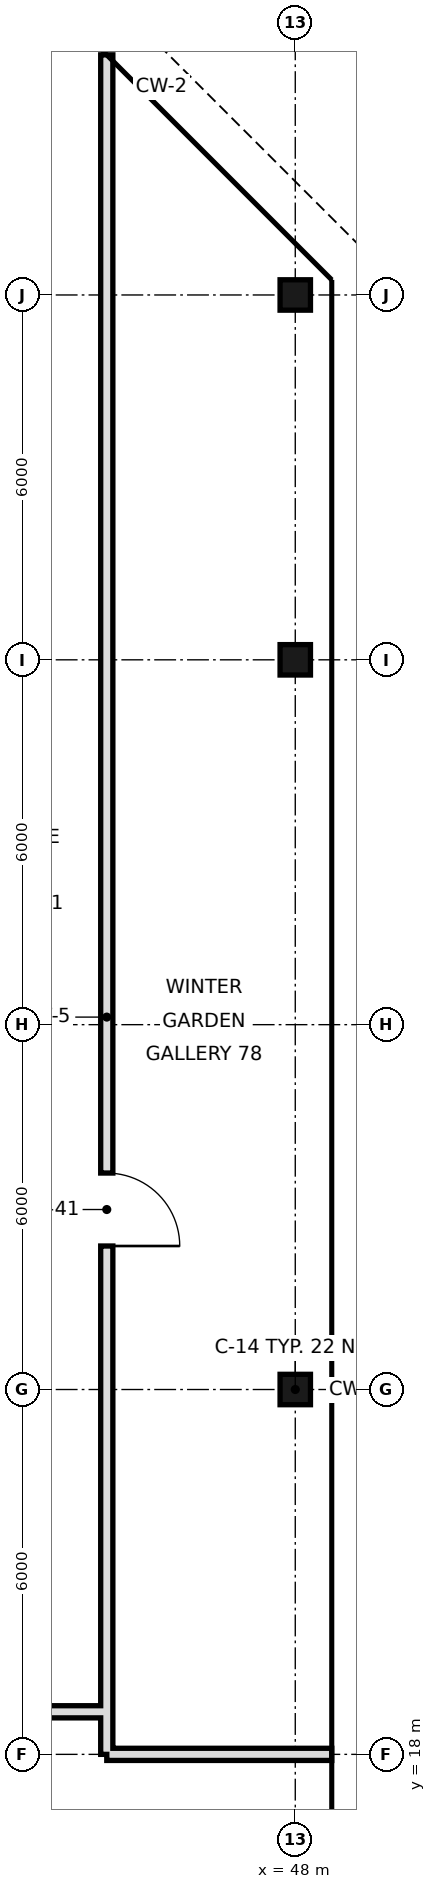
"""IFC4 building model, lengths in metres.
Left out: names, types, materials, properties, quantities, classifications, styles, units other than length and angle.
Written with IfcOpenShell. Run it as: python <this file> out.ifc"""

import sys

from ifc_helpers import new_model, si_unit, direction, frame, frame_2d, origin, origin_2d, place, context, subcontext, project, spatial, rectangle, hollow_rectangle, extrude, element, fill, save


model = new_model("IFC4")
c1 = context("Model", 3, precision=1e-05, world=origin(), true_north=direction((0.0, 1.0)))
c2 = subcontext(c1, "Body", "Model", "MODEL_VIEW")
j1 = project(units=[si_unit("LENGTHUNIT", "METRE"), si_unit("PLANEANGLEUNIT", "RADIAN")], contexts=[c1])
p1 = place(None, origin())
s1 = spatial("IfcSite", under=j1, at=p1, CompositionType="ELEMENT")
p2 = place(p1, origin())
s2 = spatial("IfcBuilding", under=s1, at=p2, CompositionType="ELEMENT")
p3 = place(p2, frame((0.0, 0.0, 326.8)))
s3 = spatial("IfcBuildingStorey", under=s2, at=p3, CompositionType="ELEMENT", Elevation=326.8)
for number, where, z_axis, x_axis in (
    (1, (48.0, 24.0, 0.0), (0.0, 0.0, 1.0), (1.0, 0.0, 0.0)),
    (2, (48.0, 36.0, 0.0), (0.0, 0.0, 1.0), (1.0, 0.0, 0.0)),
):
    element("IfcColumn", number, at=place(p3, frame(where, z_axis=z_axis, x_axis=x_axis)), inside=s3, PredefinedType="COLUMN", context=c2, shape_type="SweptSolid", body=[
        extrude(hollow_rectangle(XDim=0.5, YDim=0.5, WallThickness=0.025, at=origin_2d()), origin(), (0.0, 0.0, 1.0), 4.4),
    ])
p4 = place(p3, frame((48.0, 42.0, 0.0), z_axis=(0.0, 0.0, 1.0), x_axis=(1.0, 0.0, 0.0)))
e3 = element("IfcColumn", 3, at=p4, inside=s3, PredefinedType="COLUMN", context=c2, shape_type="SweptSolid", body=[
    extrude(hollow_rectangle(XDim=0.5, YDim=0.5, WallThickness=0.025, at=origin_2d()), origin(), (0.0, 0.0, 1.0), 4.1),
])
p5 = place(p3, frame((44.9, 18.0, 0.0), z_axis=(0.0, 0.0, 1.0), x_axis=(0.0, 1.0, 0.0)))
e4 = element("IfcWall", 4, at=p5, inside=s3, PredefinedType="SOLIDWALL", context=c2, shape_type="SweptSolid", body=[
    extrude(rectangle(XDim=27.949, YDim=0.2, at=frame_2d((13.975, 0.0))), origin(), (0.0, 0.0, 1.0), 3.5),
])
p6 = place(p5, frame((8.36, 0.0, 0.0)))
e5 = element("IfcOpeningElement", 5, at=p6, cuts=e4, PredefinedType="OPENING", context=c2, shape_type="SweptSolid", body=[
    extrude(rectangle(XDim=1.2, YDim=2.4, at=frame_2d((0.6, 1.2))), frame((0.0, 0.11, 0.0), z_axis=(0.0, -1.0, 0.0), x_axis=(1.0, 0.0, 0.0)), (0.0, 0.0, 1.0), 0.22),
])
p7 = place(p3, frame((44.9, 18.0, 0.0), z_axis=(0.0, 0.0, 1.0), x_axis=(1.0, 0.0, 0.0)))
e6 = element("IfcWall", 6, at=p7, inside=s3, PredefinedType="SOLIDWALL", context=c2, shape_type="SweptSolid", body=[
    extrude(rectangle(XDim=3.7, YDim=0.2, at=frame_2d((1.85, 0.0))), origin(), (0.0, 0.0, 1.0), 3.4),
])
p8 = place(p3, frame((17.4, 18.7, 0.0), z_axis=(0.0, 0.0, 1.0), x_axis=(1.0, 0.0, 0.0)))
e7 = element("IfcWall", 7, at=p8, inside=s3, PredefinedType="SOLIDWALL", context=c2, shape_type="SweptSolid", body=[
    extrude(rectangle(XDim=27.5, YDim=0.2, at=frame_2d((13.75, 0.0))), origin(), (0.0, 0.0, 1.0), 3.4),
])
p9 = place(p8, frame((1.8, 0.0, 0.0)))
e8 = element("IfcOpeningElement", 8, at=p9, cuts=e7, PredefinedType="OPENING", context=c2, shape_type="SweptSolid", body=[
    extrude(rectangle(XDim=1.2, YDim=2.4, at=frame_2d((0.6, 1.2))), frame((0.0, 0.11, 0.0), z_axis=(0.0, -1.0, 0.0), x_axis=(1.0, 0.0, 0.0)), (0.0, 0.0, 1.0), 0.22),
])
p10 = place(p6, frame((1.2, 0.0, 0.0), z_axis=(0.0, 0.0, 1.0), x_axis=(-1.0, 0.0, 0.0)))
e9 = element("IfcDoor", 9, at=p10, inside=s3, OperationType="SINGLE_SWING_RIGHT", PredefinedType="DOOR", context=c2, shape_type="SweptSolid", body=[
    extrude(rectangle(XDim=1.2, YDim=2.4, at=frame_2d((0.6, 1.2))), frame((0.0, 0.025, 0.0), z_axis=(0.0, -1.0, 0.0), x_axis=(1.0, 0.0, 0.0)), (0.0, 0.0, 1.0), 0.05),
])
fill(e5, e9)
save(model, sys.argv[1])
